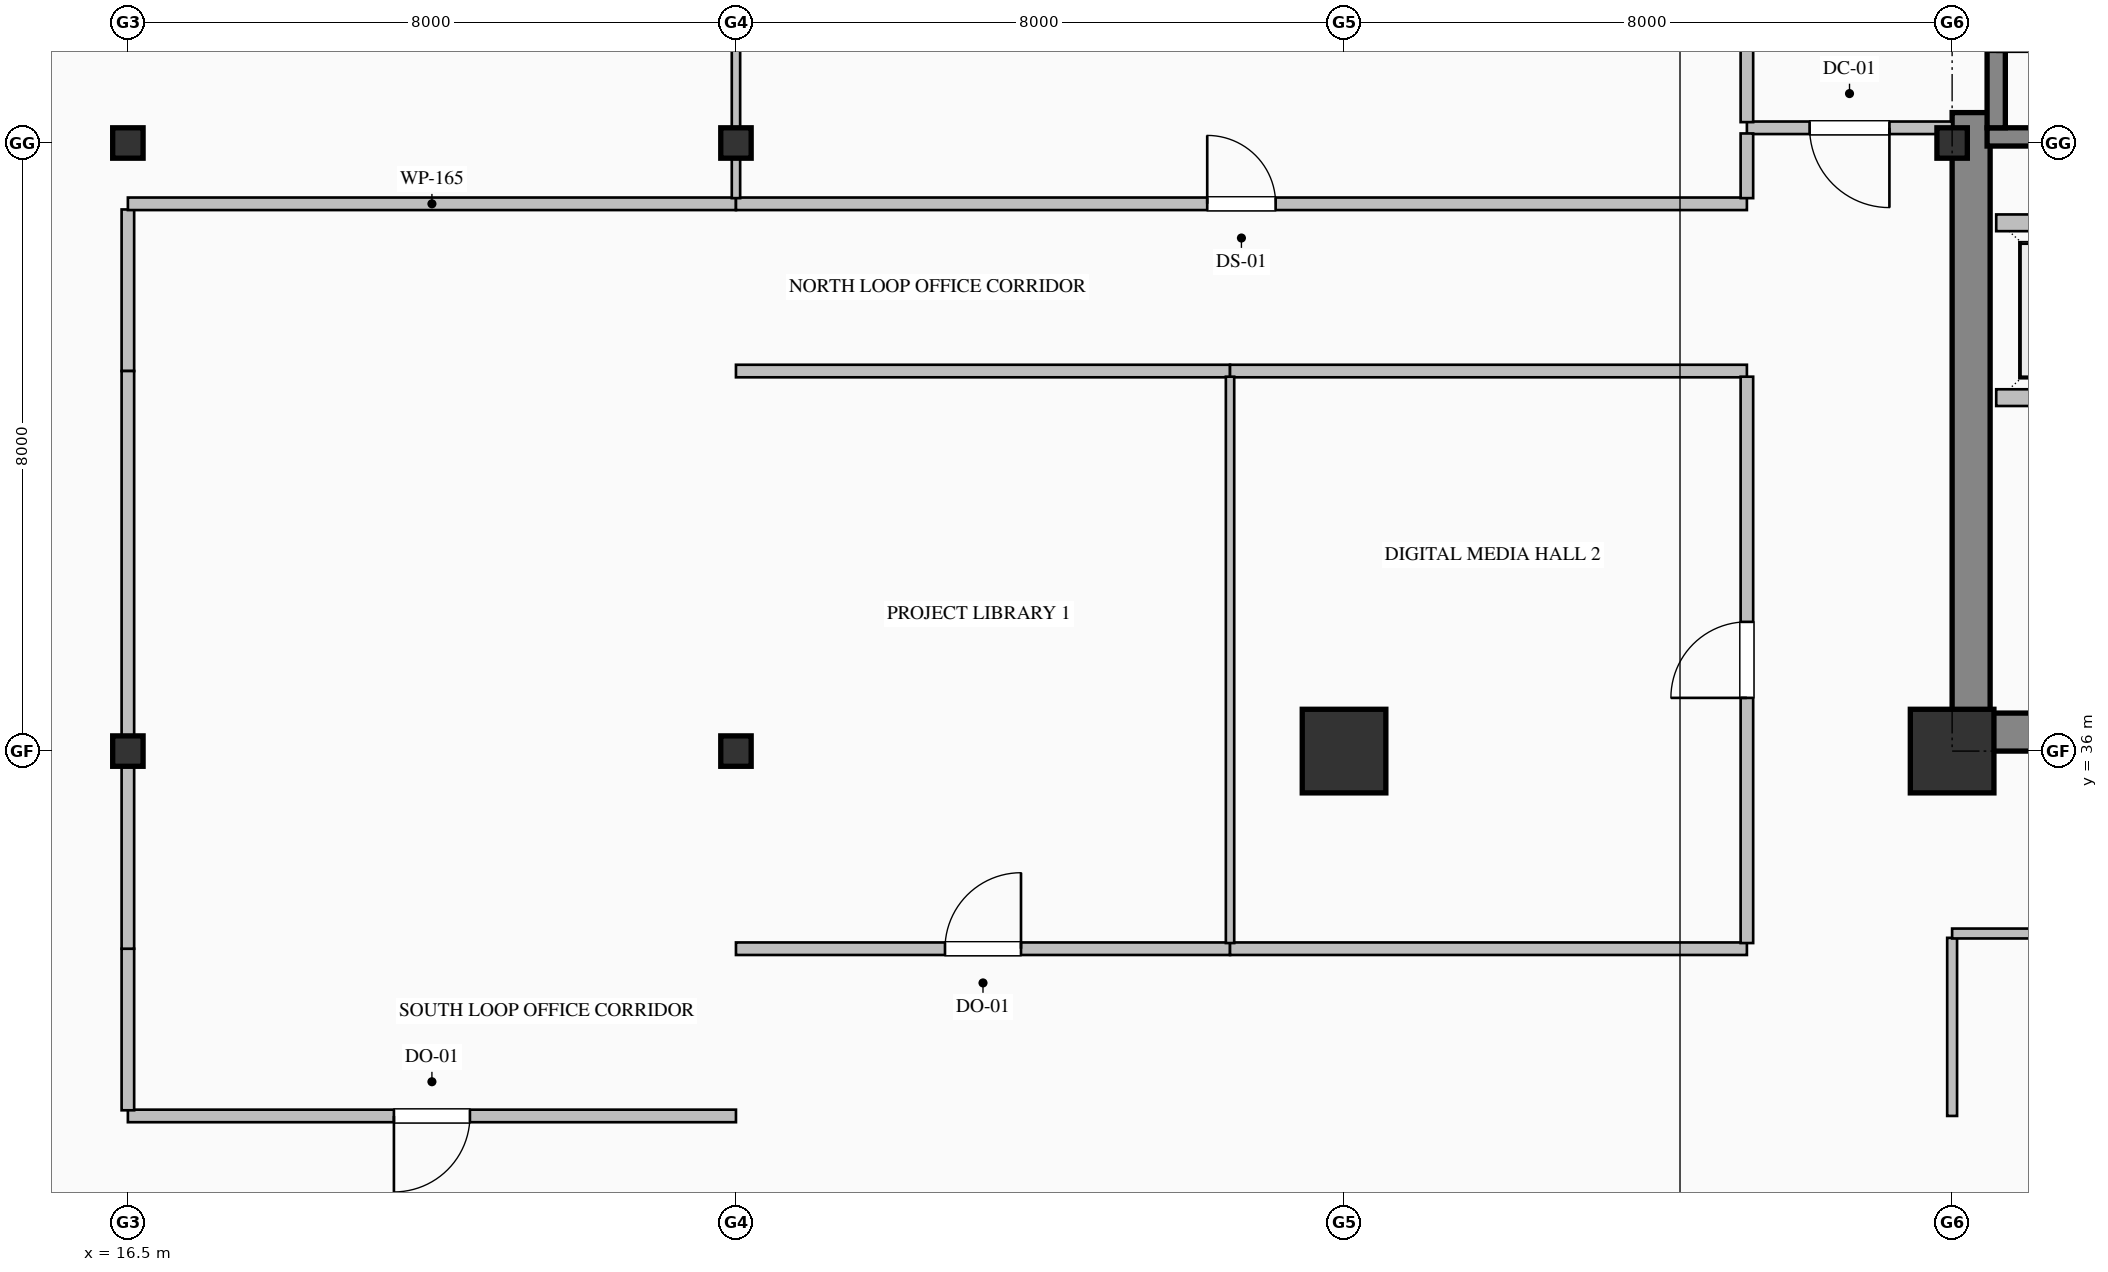
"""IFC4 building model, lengths in metres.
Left out: names, types, materials, properties, quantities, classifications, styles, units other than length and angle.
Written with IfcOpenShell. Run it as: python <this file> out.ifc"""

import sys

from ifc_helpers import new_model, si_unit, direction, frame, frame_2d, origin, origin_2d, place, context, subcontext, project, spatial, rectangle, hollow_rectangle, i_section, extrude, element, fill, save


model = new_model("IFC4")
c1 = context("Model", 3, precision=1e-05, world=origin(), true_north=direction((0.0, 1.0)))
c2 = subcontext(c1, "Body", "Model", "MODEL_VIEW")
j1 = project(units=[si_unit("LENGTHUNIT", "METRE"), si_unit("PLANEANGLEUNIT", "RADIAN")], contexts=[c1])
p1 = place(None, origin())
s1 = spatial("IfcSite", under=j1, at=p1, CompositionType="ELEMENT")
p2 = place(p1, origin())
s2 = spatial("IfcBuilding", under=s1, at=p2, CompositionType="ELEMENT")
p3 = place(p2, frame((0.0, 0.0, 147.0)))
s3 = spatial("IfcBuildingStorey", under=s2, at=p3, CompositionType="ELEMENT", Elevation=147.0)
p4 = place(p3, frame((40.75, 36.5, 0.0), z_axis=(0.0, 0.0, 1.0), x_axis=(0.0, 1.0, 0.0)))
e1 = element("IfcWall", 1, at=p4, inside=s3, PredefinedType="SHEAR", context=c2, shape_type="SweptSolid", body=[
    extrude(rectangle(XDim=7.9, YDim=0.5, at=frame_2d((3.95, 0.0))), origin(), (0.0, 0.0, 1.0), 3.765),
])
p5 = place(p3, frame((40.5, 36.25, 0.0), z_axis=(0.0, 0.0, 1.0), x_axis=(1.0, 0.0, 0.0)))
e2 = element("IfcWall", 2, at=p5, inside=s3, PredefinedType="SHEAR", context=c2, shape_type="SweptSolid", body=[
    extrude(rectangle(XDim=9.1, YDim=0.5, at=frame_2d((4.55, 0.0))), origin(), (0.0, 0.0, 1.0), 3.765),
])
for number, where, z_axis, x_axis in (
    (3, (16.5, 36.0, 0.0), (0.0, 0.0, 1.0), (1.0, 0.0, 0.0)),
    (4, (16.5, 44.0, 0.0), (0.0, 0.0, 1.0), (1.0, 0.0, 0.0)),
    (5, (24.5, 36.0, 0.0), (0.0, 0.0, 1.0), (1.0, 0.0, 0.0)),
    (6, (24.5, 44.0, 0.0), (0.0, 0.0, 1.0), (1.0, 0.0, 0.0)),
):
    element("IfcColumn", number, at=place(p3, frame(where, z_axis=z_axis, x_axis=x_axis)), inside=s3, PredefinedType="COLUMN", context=c2, shape_type="SweptSolid", body=[
        extrude(i_section(OverallWidth=0.4, OverallDepth=0.4, WebThickness=0.013, FlangeThickness=0.021, FilletRadius=0.022, at=origin_2d()), origin(), (0.0, 0.0, 1.0), 4.0),
    ])
for number, where, z_axis, x_axis in (
    (7, (32.5, 36.0, 0.0), (0.0, 0.0, 1.0), (1.0, 0.0, 0.0)),
    (8, (40.5, 36.0, 0.0), (0.0, 0.0, 1.0), (1.0, 0.0, 0.0)),
):
    element("IfcColumn", number, at=place(p3, frame(where, z_axis=z_axis, x_axis=x_axis)), inside=s3, PredefinedType="COLUMN", context=c2, shape_type="SweptSolid", body=[
        extrude(hollow_rectangle(XDim=1.1, YDim=1.1, WallThickness=0.04, at=origin_2d()), origin(), (0.0, 0.0, 1.0), 4.0),
    ])
p6 = place(p3, frame((40.5, 44.0, 0.0), z_axis=(0.0, 0.0, 1.0), x_axis=(1.0, 0.0, 0.0)))
e9 = element("IfcColumn", 9, at=p6, inside=s3, PredefinedType="COLUMN", context=c2, shape_type="SweptSolid", body=[
    extrude(i_section(OverallWidth=0.4, OverallDepth=0.4, WebThickness=0.013, FlangeThickness=0.021, FilletRadius=0.022, at=origin_2d()), origin(), (0.0, 0.0, 1.0), 4.0),
])
p7 = place(p3, frame((49.04, 44.08, 0.0), z_axis=(0.0, 0.0, 1.0), x_axis=(-1.0, 0.0, 0.0)))
e10 = element("IfcWall", 10, at=p7, inside=s3, PredefinedType="SOLIDWALL", context=c2, shape_type="SweptSolid", body=[
    extrude(rectangle(XDim=8.08, YDim=0.24, at=frame_2d((4.04, 0.0))), origin(), (0.0, 0.0, 1.0), 4.0),
])
p8 = place(p3, frame((41.08, 47.35, 0.0), z_axis=(0.0, 0.0, 1.0), x_axis=(0.0, -1.0, 0.0)))
e11 = element("IfcWall", 11, at=p8, inside=s3, PredefinedType="SOLIDWALL", context=c2, shape_type="SweptSolid", body=[
    extrude(rectangle(XDim=3.15, YDim=0.24, at=frame_2d((1.575, 0.0))), origin(), (0.0, 0.0, 1.0), 4.0),
])
p9 = place(p8, frame((1.0, 0.0, 0.0)))
e12 = element("IfcOpeningElement", 12, at=p9, cuts=e11, PredefinedType="OPENING", context=c2, shape_type="SweptSolid", body=[
    extrude(rectangle(XDim=1.15, YDim=2.2, at=frame_2d((0.575, 1.1))), frame((0.0, 0.13, 0.0), z_axis=(0.0, -1.0, 0.0), x_axis=(1.0, 0.0, 0.0)), (0.0, 0.0, 1.0), 0.26),
])
p10 = place(p3, frame((49.32, 40.65, 0.0), z_axis=(0.0, 0.0, 1.0), x_axis=(-1.0, 0.0, 0.0)))
e13 = element("IfcWall", 13, at=p10, inside=s3, PredefinedType="PARTITIONING", context=c2, shape_type="SweptSolid", body=[
    extrude(rectangle(XDim=8.24, YDim=0.22, at=frame_2d((4.12, 0.0))), origin(), (0.0, 0.0, 1.0), 3.765),
])
p11 = place(p10, frame((6.37, 0.0, 0.0)))
e14 = element("IfcOpeningElement", 14, at=p11, cuts=e13, PredefinedType="OPENING", context=c2, shape_type="SweptSolid", body=[
    extrude(rectangle(XDim=1.1, YDim=2.2, at=frame_2d((0.55, 1.1))), frame((0.0, 0.12, 0.0), z_axis=(0.0, -1.0, 0.0), x_axis=(1.0, 0.0, 0.0)), (0.0, 0.0, 1.0), 0.24),
])
p12 = place(p10, frame((3.57, 0.0, 0.0)))
e15 = element("IfcOpeningElement", 15, at=p12, cuts=e13, PredefinedType="OPENING", context=c2, shape_type="SweptSolid", body=[
    extrude(rectangle(XDim=1.1, YDim=2.2, at=frame_2d((0.55, 1.1))), frame((0.0, 0.12, 0.0), z_axis=(0.0, -1.0, 0.0), x_axis=(1.0, 0.0, 0.0)), (0.0, 0.0, 1.0), 0.24),
])
p13 = place(p10, frame((0.77, 0.0, 0.0)))
e16 = element("IfcOpeningElement", 16, at=p13, cuts=e13, PredefinedType="OPENING", context=c2, shape_type="SweptSolid", body=[
    extrude(rectangle(XDim=1.1, YDim=2.2, at=frame_2d((0.55, 1.1))), frame((0.0, 0.12, 0.0), z_axis=(0.0, -1.0, 0.0), x_axis=(1.0, 0.0, 0.0)), (0.0, 0.0, 1.0), 0.24),
])
p14 = place(p3, frame((41.08, 42.95, 0.0), z_axis=(0.0, 0.0, 1.0), x_axis=(1.0, 0.0, 0.0)))
e17 = element("IfcWall", 17, at=p14, inside=s3, PredefinedType="PARTITIONING", context=c2, shape_type="SweptSolid", body=[
    extrude(rectangle(XDim=8.24, YDim=0.22, at=frame_2d((4.12, 0.0))), origin(), (0.0, 0.0, 1.0), 3.765),
])
p15 = place(p3, frame((40.5, 44.2, 0.0), z_axis=(0.0, 0.0, 1.0), x_axis=(-1.0, 0.0, 0.0)))
e18 = element("IfcWall", 18, at=p15, inside=s3, PredefinedType="PARTITIONING", context=c2, shape_type="SweptSolid", body=[
    extrude(rectangle(XDim=2.7, YDim=0.165, at=frame_2d((1.35, 0.0))), origin(), (0.0, 0.0, 1.0), 3.765),
])
p16 = place(p15, frame((0.825, 0.0, 0.0)))
e19 = element("IfcOpeningElement", 19, at=p16, cuts=e18, PredefinedType="OPENING", context=c2, shape_type="SweptSolid", body=[
    extrude(rectangle(XDim=1.05, YDim=2.15, at=frame_2d((0.525, 1.075))), frame((0.0, 0.093, 0.0), z_axis=(0.0, -1.0, 0.0), x_axis=(1.0, 0.0, 0.0)), (0.0, 0.0, 1.0), 0.185),
])
p17 = place(p3, frame((37.8, 44.274, 0.0), z_axis=(0.0, 0.0, 1.0), x_axis=(0.0, 1.0, 0.0)))
e20 = element("IfcWall", 20, at=p17, inside=s3, PredefinedType="PARTITIONING", context=c2, shape_type="SweptSolid", body=[
    extrude(rectangle(XDim=3.051, YDim=0.165, at=frame_2d((1.525, 0.0))), origin(), (0.0, 0.0, 1.0), 3.765),
])
p18 = place(p3, frame((24.5, 31.2, 0.0), z_axis=(0.0, 0.0, 1.0), x_axis=(-1.0, 0.0, 0.0)))
e21 = element("IfcWall", 21, at=p18, inside=s3, PredefinedType="PARTITIONING", context=c2, shape_type="SweptSolid", body=[
    extrude(rectangle(XDim=8.0, YDim=0.165, at=frame_2d((4.0, 0.0))), origin(), (0.0, 0.0, 1.0), 3.765),
])
p19 = place(p18, frame((3.5, 0.0, 0.0)))
e22 = element("IfcOpeningElement", 22, at=p19, cuts=e21, PredefinedType="OPENING", context=c2, shape_type="SweptSolid", body=[
    extrude(rectangle(XDim=1.0, YDim=2.15, at=frame_2d((0.5, 1.075))), frame((0.0, 0.093, 0.0), z_axis=(0.0, -1.0, 0.0), x_axis=(1.0, 0.0, 0.0)), (0.0, 0.0, 1.0), 0.185),
])
p20 = place(p3, frame((16.5, 31.274, 0.0), z_axis=(0.0, 0.0, 1.0), x_axis=(0.0, 1.0, 0.0)))
e23 = element("IfcWall", 23, at=p20, inside=s3, PredefinedType="PARTITIONING", context=c2, shape_type="SweptSolid", body=[
    extrude(rectangle(XDim=2.125, YDim=0.165, at=frame_2d((1.063, 0.0))), origin(), (0.0, 0.0, 1.0), 3.157),
])
p21 = place(p3, frame((24.5, 33.4, 0.0), z_axis=(0.0, 0.0, 1.0), x_axis=(1.0, 0.0, 0.0)))
e24 = element("IfcWall", 24, at=p21, inside=s3, PredefinedType="PARTITIONING", context=c2, shape_type="SweptSolid", body=[
    extrude(rectangle(XDim=6.5, YDim=0.165, at=frame_2d((3.25, 0.0))), origin(), (0.0, 0.0, 1.0), 3.765),
])
p22 = place(p21, frame((2.75, 0.0, 0.0)))
e25 = element("IfcOpeningElement", 25, at=p22, cuts=e24, PredefinedType="OPENING", context=c2, shape_type="SweptSolid", body=[
    extrude(rectangle(XDim=1.0, YDim=2.15, at=frame_2d((0.5, 1.075))), frame((0.0, 0.093, 0.0), z_axis=(0.0, -1.0, 0.0), x_axis=(1.0, 0.0, 0.0)), (0.0, 0.0, 1.0), 0.185),
])
p23 = place(p3, frame((31.0, 33.4, 0.0), z_axis=(0.0, 0.0, 1.0), x_axis=(1.0, 0.0, 0.0)))
e26 = element("IfcWall", 26, at=p23, inside=s3, PredefinedType="PARTITIONING", context=c2, shape_type="SweptSolid", body=[
    extrude(rectangle(XDim=6.8, YDim=0.165, at=frame_2d((3.4, 0.0))), origin(), (0.0, 0.0, 1.0), 3.765),
])
p24 = place(p3, frame((16.5, 41.0, 0.0), z_axis=(0.0, 0.0, 1.0), x_axis=(0.0, 1.0, 0.0)))
e27 = element("IfcWall", 27, at=p24, inside=s3, PredefinedType="PARTITIONING", context=c2, shape_type="SweptSolid", body=[
    extrude(rectangle(XDim=2.125, YDim=0.165, at=frame_2d((1.063, 0.0))), origin(), (0.0, 0.0, 1.0), 3.157),
])
p25 = place(p3, frame((16.5, 43.2, 0.0), z_axis=(0.0, 0.0, 1.0), x_axis=(1.0, 0.0, 0.0)))
e28 = element("IfcWall", 28, at=p25, inside=s3, PredefinedType="PARTITIONING", context=c2, shape_type="SweptSolid", body=[
    extrude(rectangle(XDim=8.0, YDim=0.165, at=frame_2d((4.0, 0.0))), origin(), (0.0, 0.0, 1.0), 3.765),
])
p26 = place(p3, frame((24.5, 43.2, 0.0), z_axis=(0.0, 0.0, 1.0), x_axis=(1.0, 0.0, 0.0)))
e29 = element("IfcWall", 29, at=p26, inside=s3, PredefinedType="PARTITIONING", context=c2, shape_type="SweptSolid", body=[
    extrude(rectangle(XDim=13.3, YDim=0.165, at=frame_2d((6.65, 0.0))), origin(), (0.0, 0.0, 1.0), 3.765),
])
p27 = place(p26, frame((6.2, 0.0, 0.0)))
e30 = element("IfcOpeningElement", 30, at=p27, cuts=e29, PredefinedType="OPENING", context=c2, shape_type="SweptSolid", body=[
    extrude(rectangle(XDim=0.9, YDim=2.15, at=frame_2d((0.45, 1.075))), frame((0.0, 0.093, 0.0), z_axis=(0.0, -1.0, 0.0), x_axis=(1.0, 0.0, 0.0)), (0.0, 0.0, 1.0), 0.185),
])
p28 = place(p3, frame((31.0, 41.0, 0.0), z_axis=(0.0, 0.0, 1.0), x_axis=(-1.0, 0.0, 0.0)))
e31 = element("IfcWall", 31, at=p28, inside=s3, PredefinedType="PARTITIONING", context=c2, shape_type="SweptSolid", body=[
    extrude(rectangle(XDim=6.5, YDim=0.165, at=frame_2d((3.25, 0.0))), origin(), (0.0, 0.0, 1.0), 3.765),
])
p29 = place(p3, frame((37.8, 41.0, 0.0), z_axis=(0.0, 0.0, 1.0), x_axis=(-1.0, 0.0, 0.0)))
e32 = element("IfcWall", 32, at=p29, inside=s3, PredefinedType="PARTITIONING", context=c2, shape_type="SweptSolid", body=[
    extrude(rectangle(XDim=6.8, YDim=0.165, at=frame_2d((3.4, 0.0))), origin(), (0.0, 0.0, 1.0), 3.765),
])
p30 = place(p3, frame((16.5, 33.4, 0.0), z_axis=(0.0, 0.0, 1.0), x_axis=(0.0, 1.0, 0.0)))
e33 = element("IfcWall", 33, at=p30, inside=s3, PredefinedType="PARTITIONING", context=c2, shape_type="SweptSolid", body=[
    extrude(rectangle(XDim=7.6, YDim=0.165, at=frame_2d((3.8, 0.0))), origin(), (0.0, 0.0, 1.0), 3.157),
])
p31 = place(p3, frame((37.8, 43.274, 0.0), z_axis=(0.0, 0.0, 1.0), x_axis=(0.0, 1.0, 0.0)))
e34 = element("IfcWall", 34, at=p31, inside=s3, PredefinedType="PARTITIONING", context=c2, shape_type="SweptSolid", body=[
    extrude(rectangle(XDim=0.851, YDim=0.165, at=frame_2d((0.426, 0.0))), origin(), (0.0, 0.0, 1.0), 3.765),
])
p32 = place(p3, frame((37.8, 33.475, 0.0), z_axis=(0.0, 0.0, 1.0), x_axis=(0.0, 1.0, 0.0)))
e35 = element("IfcWall", 35, at=p32, inside=s3, PredefinedType="PARTITIONING", context=c2, shape_type="SweptSolid", body=[
    extrude(rectangle(XDim=7.451, YDim=0.165, at=frame_2d((3.726, 0.0))), origin(), (0.0, 0.0, 1.0), 3.765),
])
p33 = place(p32, frame((3.226, 0.0, 0.0)))
e36 = element("IfcOpeningElement", 36, at=p33, cuts=e35, PredefinedType="OPENING", context=c2, shape_type="SweptSolid", body=[
    extrude(rectangle(XDim=1.0, YDim=2.15, at=frame_2d((0.5, 1.075))), frame((0.0, 0.093, 0.0), z_axis=(0.0, -1.0, 0.0), x_axis=(1.0, 0.0, 0.0)), (0.0, 0.0, 1.0), 0.185),
])
p34 = place(p3, frame((40.5, 33.543, 0.0), z_axis=(0.0, 0.0, 1.0), x_axis=(0.0, -1.0, 0.0)))
e37 = element("IfcWall", 37, at=p34, inside=s3, PredefinedType="PARTITIONING", context=c2, shape_type="SweptSolid", body=[
    extrude(rectangle(XDim=2.343, YDim=0.13, at=frame_2d((1.171, 0.0))), origin(), (0.0, 0.0, 1.0), 3.157),
])
p35 = place(p3, frame((50.8, 33.6, 0.0), z_axis=(0.0, 0.0, 1.0), x_axis=(-1.0, 0.0, 0.0)))
e38 = element("IfcWall", 38, at=p35, inside=s3, PredefinedType="PARTITIONING", context=c2, shape_type="SweptSolid", body=[
    extrude(rectangle(XDim=10.3, YDim=0.13, at=frame_2d((5.15, 0.0))), origin(), (0.0, 0.0, 1.0), 3.765),
])
p36 = place(p3, frame((24.5, 51.668, 0.0), z_axis=(0.0, 0.0, 1.0), x_axis=(0.0, -1.0, 0.0)))
e39 = element("IfcWall", 39, at=p36, inside=s3, PredefinedType="MOVABLE", context=c2, shape_type="SweptSolid", body=[
    extrude(rectangle(XDim=8.394, YDim=0.11, at=frame_2d((4.197, 0.0))), origin(), (0.0, 0.0, 1.0), 3.157),
])
p37 = place(p3, frame((31.0, 40.926, 0.0), z_axis=(0.0, 0.0, 1.0), x_axis=(0.0, -1.0, 0.0)))
e40 = element("IfcWall", 40, at=p37, inside=s3, PredefinedType="MOVABLE", context=c2, shape_type="SweptSolid", body=[
    extrude(rectangle(XDim=7.451, YDim=0.11, at=frame_2d((3.726, 0.0))), origin(), (0.0, 0.0, 1.0), 3.765),
])
p38 = place(p16, origin())
e41 = element("IfcDoor", 41, at=p38, inside=s3, OperationType="SINGLE_SWING_LEFT", PredefinedType="DOOR", context=c2, shape_type="SweptSolid", body=[
    extrude(rectangle(XDim=1.05, YDim=2.15, at=frame_2d((0.525, 1.075))), frame((0.0, 0.025, 0.0), z_axis=(0.0, -1.0, 0.0), x_axis=(1.0, 0.0, 0.0)), (0.0, 0.0, 1.0), 0.05),
])
fill(e19, e41)
p39 = place(p19, origin())
e42 = element("IfcDoor", 42, at=p39, inside=s3, OperationType="SINGLE_SWING_RIGHT", PredefinedType="DOOR", context=c2, shape_type="SweptSolid", body=[
    extrude(rectangle(XDim=1.0, YDim=2.15, at=frame_2d((0.5, 1.075))), frame((0.0, 0.025, 0.0), z_axis=(0.0, -1.0, 0.0), x_axis=(1.0, 0.0, 0.0)), (0.0, 0.0, 1.0), 0.05),
])
fill(e22, e42)
p40 = place(p27, origin())
e43 = element("IfcDoor", 43, at=p40, inside=s3, OperationType="SINGLE_SWING_LEFT", PredefinedType="DOOR", context=c2, shape_type="SweptSolid", body=[
    extrude(rectangle(XDim=0.9, YDim=2.15, at=frame_2d((0.45, 1.075))), frame((0.0, 0.025, 0.0), z_axis=(0.0, -1.0, 0.0), x_axis=(1.0, 0.0, 0.0)), (0.0, 0.0, 1.0), 0.05),
])
fill(e30, e43)
p41 = place(p22, origin())
e44 = element("IfcDoor", 44, at=p41, inside=s3, OperationType="SINGLE_SWING_RIGHT", PredefinedType="DOOR", context=c2, shape_type="SweptSolid", body=[
    extrude(rectangle(XDim=1.0, YDim=2.15, at=frame_2d((0.5, 1.075))), frame((0.0, 0.025, 0.0), z_axis=(0.0, -1.0, 0.0), x_axis=(1.0, 0.0, 0.0)), (0.0, 0.0, 1.0), 0.05),
])
fill(e25, e44)
p42 = place(p33, origin())
e45 = element("IfcDoor", 45, at=p42, inside=s3, OperationType="SINGLE_SWING_LEFT", PredefinedType="DOOR", context=c2, shape_type="SweptSolid", body=[
    extrude(rectangle(XDim=1.0, YDim=2.15, at=frame_2d((0.5, 1.075))), frame((0.0, 0.025, 0.0), z_axis=(0.0, -1.0, 0.0), x_axis=(1.0, 0.0, 0.0)), (0.0, 0.0, 1.0), 0.05),
])
fill(e36, e45)
save(model, sys.argv[1])
